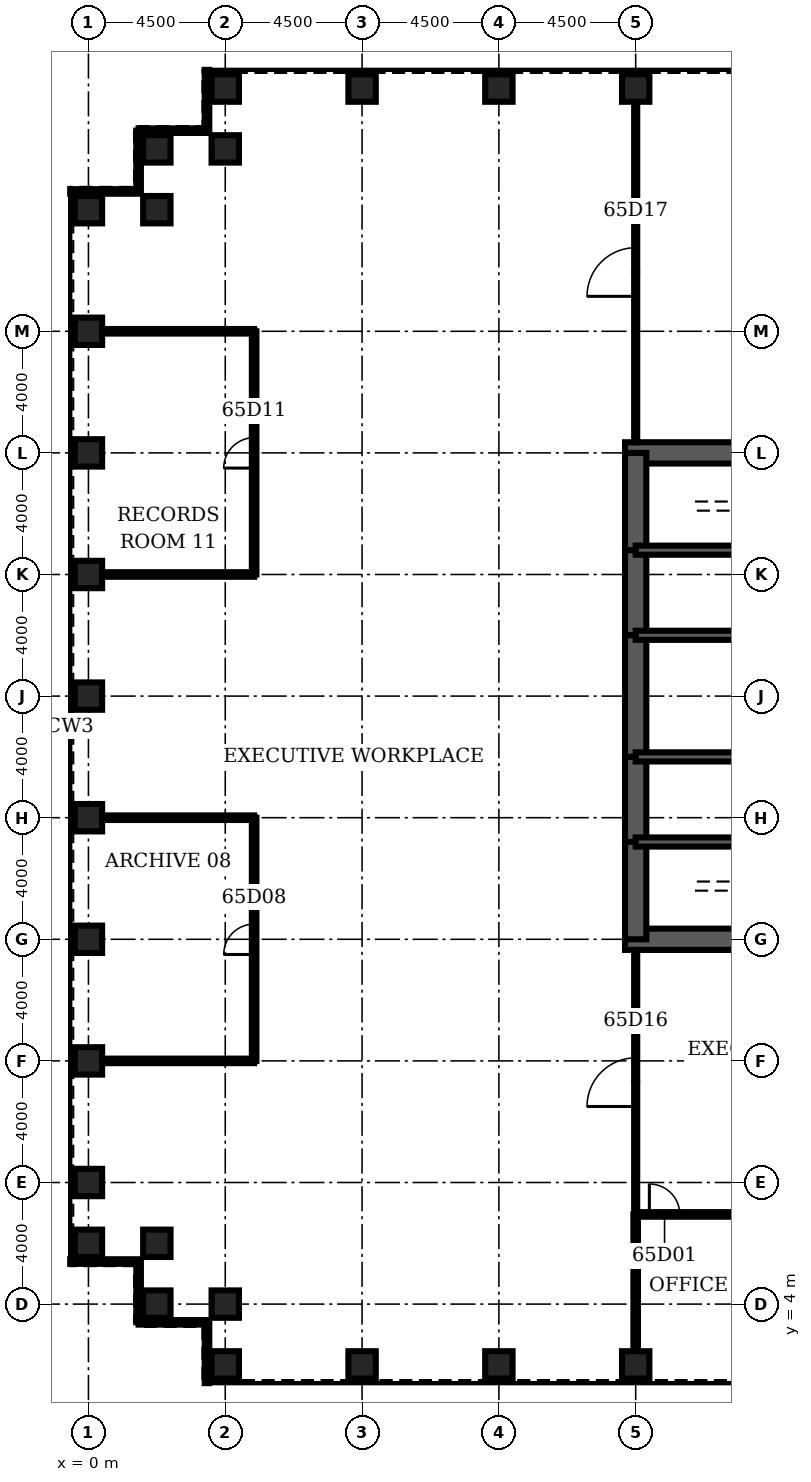
"""IFC4 building model, lengths in metres.
Left out: names, types, materials, properties, quantities, classifications, styles, units other than length and angle.
Written with IfcOpenShell. Run it as: python <this file> out.ifc"""

import sys

from ifc_helpers import new_model, si_unit, direction, frame, frame_2d, origin, origin_2d, place, context, subcontext, project, spatial, rectangle, hollow_rectangle, extrude, element, fill, save


model = new_model("IFC4")
c1 = context("Model", 3, precision=1e-05, world=origin(), true_north=direction((0.0, 1.0)))
c2 = subcontext(c1, "Body", "Model", "MODEL_VIEW")
j1 = project(units=[si_unit("LENGTHUNIT", "METRE"), si_unit("PLANEANGLEUNIT", "RADIAN")], contexts=[c1])
p1 = place(None, origin())
s1 = spatial("IfcSite", under=j1, at=p1, CompositionType="ELEMENT")
p2 = place(p1, origin())
s2 = spatial("IfcBuilding", under=s1, at=p2, CompositionType="ELEMENT")
p3 = place(p2, frame((0.0, 0.0, 287.9)))
s3 = spatial("IfcBuildingStorey", under=s2, at=p3, CompositionType="ELEMENT", Elevation=287.9)
for number, where, z_axis, x_axis in (
    (1, (4.5, 2.0, 0.0), (0.0, 0.0, 1.0), (0.0, 1.0, 0.0)),
    (2, (9.0, 2.0, 0.0), (0.0, 0.0, 1.0), (0.0, 1.0, 0.0)),
    (3, (13.5, 2.0, 0.0), (0.0, 0.0, 1.0), (0.0, 1.0, 0.0)),
    (4, (18.0, 2.0, 0.0), (0.0, 0.0, 1.0), (0.0, 1.0, 0.0)),
    (5, (18.0, 44.0, 0.0), (0.0, 0.0, 1.0), (0.0, 1.0, 0.0)),
    (6, (13.5, 44.0, 0.0), (0.0, 0.0, 1.0), (0.0, 1.0, 0.0)),
    (7, (9.0, 44.0, 0.0), (0.0, 0.0, 1.0), (0.0, 1.0, 0.0)),
    (8, (4.5, 44.0, 0.0), (0.0, 0.0, 1.0), (0.0, 1.0, 0.0)),
    (9, (4.5, 42.0, 0.0), (0.0, 0.0, 1.0), (0.0, 1.0, 0.0)),
    (10, (2.25, 42.0, 0.0), (0.0, 0.0, 1.0), (1.0, 0.0, 0.0)),
    (11, (2.25, 40.0, 0.0), (0.0, 0.0, 1.0), (1.0, 0.0, 0.0)),
    (12, (0.0, 40.0, 0.0), (0.0, 0.0, 1.0), (1.0, 0.0, 0.0)),
    (13, (0.0, 36.0, 0.0), (0.0, 0.0, 1.0), (1.0, 0.0, 0.0)),
    (14, (0.0, 32.0, 0.0), (0.0, 0.0, 1.0), (1.0, 0.0, 0.0)),
    (15, (0.0, 28.0, 0.0), (0.0, 0.0, 1.0), (1.0, 0.0, 0.0)),
    (16, (0.0, 24.0, 0.0), (0.0, 0.0, 1.0), (1.0, 0.0, 0.0)),
    (17, (0.0, 20.0, 0.0), (0.0, 0.0, 1.0), (1.0, 0.0, 0.0)),
    (18, (0.0, 16.0, 0.0), (0.0, 0.0, 1.0), (1.0, 0.0, 0.0)),
    (19, (0.0, 12.0, 0.0), (0.0, 0.0, 1.0), (1.0, 0.0, 0.0)),
    (20, (0.0, 8.0, 0.0), (0.0, 0.0, 1.0), (1.0, 0.0, 0.0)),
    (21, (0.0, 6.0, 0.0), (0.0, 0.0, 1.0), (1.0, 0.0, 0.0)),
    (22, (2.25, 6.0, 0.0), (0.0, 0.0, 1.0), (1.0, 0.0, 0.0)),
    (23, (2.25, 4.0, 0.0), (0.0, 0.0, 1.0), (1.0, 0.0, 0.0)),
    (24, (4.5, 4.0, 0.0), (0.0, 0.0, 1.0), (0.0, 1.0, 0.0)),
):
    element("IfcColumn", number, at=place(p3, frame(where, z_axis=z_axis, x_axis=x_axis)), inside=s3, PredefinedType="COLUMN", context=c2, shape_type="SweptSolid", body=[
        extrude(hollow_rectangle(XDim=0.9, YDim=0.9, WallThickness=0.07, at=origin_2d()), origin(), (0.0, 0.0, 1.0), 4.2),
    ])
for number, where, z_axis, x_axis in (
    (25, (17.65, 16.0, 0.0), (0.0, 0.0, 1.0), (1.0, 0.0, 0.0)),
    (26, (27.0, 32.0, 0.0), (0.0, 0.0, 1.0), (-1.0, 0.0, 0.0)),
):
    element("IfcWall", number, at=place(p3, frame(where, z_axis=z_axis, x_axis=x_axis)), inside=s3, PredefinedType="SHEAR", context=c2, shape_type="SweptSolid", body=[
        extrude(rectangle(XDim=9.35, YDim=0.7, at=frame_2d((4.675, 0.0))), origin(), (0.0, 0.0, 1.0), 4.2),
    ])
p4 = place(p3, frame((18.0, 32.0, 0.0), z_axis=(0.0, 0.0, 1.0), x_axis=(0.0, -1.0, 0.0)))
e27 = element("IfcWall", 27, at=p4, inside=s3, PredefinedType="SHEAR", context=c2, shape_type="SweptSolid", body=[
    extrude(rectangle(XDim=3.2, YDim=0.7, at=frame_2d((1.6, 0.0))), origin(), (0.0, 0.0, 1.0), 4.2),
])
p5 = place(p3, frame((18.0, 28.8, 0.0), z_axis=(0.0, 0.0, 1.0), x_axis=(0.0, -1.0, 0.0)))
e28 = element("IfcWall", 28, at=p5, inside=s3, PredefinedType="SHEAR", context=c2, shape_type="SweptSolid", body=[
    extrude(rectangle(XDim=2.8, YDim=0.7, at=frame_2d((1.4, 0.0))), origin(), (0.0, 0.0, 1.0), 4.2),
])
p6 = place(p5, frame((0.4, 0.0, 0.0)))
e29 = element("IfcOpeningElement", 29, at=p6, cuts=e28, PredefinedType="OPENING", context=c2, shape_type="SweptSolid", body=[
    extrude(rectangle(XDim=1.8, YDim=2.1, at=frame_2d((0.9, 1.05))), frame((0.0, 0.36, 0.0), z_axis=(0.0, -1.0, 0.0), x_axis=(1.0, 0.0, 0.0)), (0.0, 0.0, 1.0), 0.72),
])
p7 = place(p3, frame((18.0, 26.0, 0.0), z_axis=(0.0, 0.0, 1.0), x_axis=(0.0, -1.0, 0.0)))
e30 = element("IfcWall", 30, at=p7, inside=s3, PredefinedType="SHEAR", context=c2, shape_type="SweptSolid", body=[
    extrude(rectangle(XDim=4.0, YDim=0.7, at=frame_2d((2.0, 0.0))), origin(), (0.0, 0.0, 1.0), 4.2),
])
p8 = place(p3, frame((18.0, 22.0, 0.0), z_axis=(0.0, 0.0, 1.0), x_axis=(0.0, -1.0, 0.0)))
e31 = element("IfcWall", 31, at=p8, inside=s3, PredefinedType="SHEAR", context=c2, shape_type="SweptSolid", body=[
    extrude(rectangle(XDim=2.8, YDim=0.7, at=frame_2d((1.4, 0.0))), origin(), (0.0, 0.0, 1.0), 4.2),
])
p9 = place(p8, frame((0.6, 0.0, 0.0)))
e32 = element("IfcOpeningElement", 32, at=p9, cuts=e31, PredefinedType="OPENING", context=c2, shape_type="SweptSolid", body=[
    extrude(rectangle(XDim=1.8, YDim=2.1, at=frame_2d((0.9, 1.05))), frame((0.0, 0.36, 0.0), z_axis=(0.0, -1.0, 0.0), x_axis=(1.0, 0.0, 0.0)), (0.0, 0.0, 1.0), 0.72),
])
p10 = place(p3, frame((18.0, 19.2, 0.0), z_axis=(0.0, 0.0, 1.0), x_axis=(0.0, -1.0, 0.0)))
e33 = element("IfcWall", 33, at=p10, inside=s3, PredefinedType="SHEAR", context=c2, shape_type="SweptSolid", body=[
    extrude(rectangle(XDim=3.2, YDim=0.7, at=frame_2d((1.6, 0.0))), origin(), (0.0, 0.0, 1.0), 4.2),
])
p11 = place(p3, frame((18.0, 19.2, 0.0), z_axis=(0.0, 0.0, 1.0), x_axis=(1.0, 0.0, 0.0)))
e34 = element("IfcWall", 34, at=p11, inside=s3, PredefinedType="SOLIDWALL", context=c2, shape_type="SweptSolid", body=[
    extrude(rectangle(XDim=9.0, YDim=0.3, at=frame_2d((4.5, 0.0))), origin(), (0.0, 0.0, 1.0), 4.2),
])
p12 = place(p11, frame((0.65, 0.0, 0.0)))
e35 = element("IfcOpeningElement", 35, at=p12, cuts=e34, PredefinedType="OPENING", context=c2, shape_type="SweptSolid", body=[
    extrude(rectangle(XDim=1.0, YDim=2.1, at=frame_2d((0.5, 1.05))), frame((0.0, 0.16, 0.0), z_axis=(0.0, -1.0, 0.0), x_axis=(1.0, 0.0, 0.0)), (0.0, 0.0, 1.0), 0.32),
])
p13 = place(p3, frame((18.0, 28.8, 0.0), z_axis=(0.0, 0.0, 1.0), x_axis=(1.0, 0.0, 0.0)))
e36 = element("IfcWall", 36, at=p13, inside=s3, PredefinedType="SOLIDWALL", context=c2, shape_type="SweptSolid", body=[
    extrude(rectangle(XDim=9.0, YDim=0.3, at=frame_2d((4.5, 0.0))), origin(), (0.0, 0.0, 1.0), 4.2),
])
p14 = place(p13, frame((0.65, 0.0, 0.0)))
e37 = element("IfcOpeningElement", 37, at=p14, cuts=e36, PredefinedType="OPENING", context=c2, shape_type="SweptSolid", body=[
    extrude(rectangle(XDim=1.0, YDim=2.1, at=frame_2d((0.5, 1.05))), frame((0.0, 0.16, 0.0), z_axis=(0.0, -1.0, 0.0), x_axis=(1.0, 0.0, 0.0)), (0.0, 0.0, 1.0), 0.32),
])
p15 = place(p3, frame((18.0, 22.0, 0.0), z_axis=(0.0, 0.0, 1.0), x_axis=(1.0, 0.0, 0.0)))
e38 = element("IfcWall", 38, at=p15, inside=s3, PredefinedType="SOLIDWALL", context=c2, shape_type="SweptSolid", body=[
    extrude(rectangle(XDim=6.0, YDim=0.3, at=frame_2d((3.0, 0.0))), origin(), (0.0, 0.0, 1.0), 4.2),
])
p16 = place(p15, frame((4.4, 0.0, 0.0)))
e39 = element("IfcOpeningElement", 39, at=p16, cuts=e38, PredefinedType="OPENING", context=c2, shape_type="SweptSolid", body=[
    extrude(rectangle(XDim=1.0, YDim=2.1, at=frame_2d((0.5, 1.05))), frame((0.0, 0.16, 0.0), z_axis=(0.0, -1.0, 0.0), x_axis=(1.0, 0.0, 0.0)), (0.0, 0.0, 1.0), 0.32),
])
p17 = place(p15, frame((0.75, 0.0, 0.0)))
e40 = element("IfcOpeningElement", 40, at=p17, cuts=e38, PredefinedType="OPENING", context=c2, shape_type="SweptSolid", body=[
    extrude(rectangle(XDim=1.0, YDim=2.1, at=frame_2d((0.5, 1.05))), frame((0.0, 0.16, 0.0), z_axis=(0.0, -1.0, 0.0), x_axis=(1.0, 0.0, 0.0)), (0.0, 0.0, 1.0), 0.32),
])
p18 = place(p3, frame((18.0, 26.0, 0.0), z_axis=(0.0, 0.0, 1.0), x_axis=(1.0, 0.0, 0.0)))
e41 = element("IfcWall", 41, at=p18, inside=s3, PredefinedType="SOLIDWALL", context=c2, shape_type="SweptSolid", body=[
    extrude(rectangle(XDim=6.0, YDim=0.3, at=frame_2d((3.0, 0.0))), origin(), (0.0, 0.0, 1.0), 4.2),
])
p19 = place(p3, frame((20.225, 22.15, 0.0), z_axis=(0.0, 0.0, 1.0), x_axis=(0.0, 1.0, 0.0)))
e42 = element("IfcWall", 42, at=p19, inside=s3, PredefinedType="PARTITIONING", context=c2, shape_type="SweptSolid", body=[
    extrude(rectangle(XDim=3.7, YDim=0.15, at=frame_2d((1.85, 0.0))), origin(), (0.0, 0.0, 1.0), 3.0),
])
p20 = place(p3, frame((18.0, 6.95, 0.0), z_axis=(0.0, 0.0, 1.0), x_axis=(1.0, 0.0, 0.0)))
e43 = element("IfcWall", 43, at=p20, inside=s3, PredefinedType="PARTITIONING", context=c2, shape_type="SweptSolid", body=[
    extrude(rectangle(XDim=27.0, YDim=0.15, at=frame_2d((13.5, 0.0))), origin(), (0.0, 0.0, 1.0), 3.0),
])
p21 = place(p20, frame((0.45, 0.0, 0.0)))
e44 = element("IfcOpeningElement", 44, at=p21, cuts=e43, PredefinedType="OPENING", context=c2, shape_type="SweptSolid", body=[
    extrude(rectangle(XDim=1.0, YDim=2.1, at=frame_2d((0.5, 1.05))), frame((0.0, 0.085, 0.0), z_axis=(0.0, -1.0, 0.0), x_axis=(1.0, 0.0, 0.0)), (0.0, 0.0, 1.0), 0.17),
])
p22 = place(p20, frame((4.95, 0.0, 0.0)))
e45 = element("IfcOpeningElement", 45, at=p22, cuts=e43, PredefinedType="OPENING", context=c2, shape_type="SweptSolid", body=[
    extrude(rectangle(XDim=1.0, YDim=2.1, at=frame_2d((0.5, 1.05))), frame((0.0, 0.085, 0.0), z_axis=(0.0, -1.0, 0.0), x_axis=(1.0, 0.0, 0.0)), (0.0, 0.0, 1.0), 0.17),
])
p23 = place(p20, frame((9.45, 0.0, 0.0)))
e46 = element("IfcOpeningElement", 46, at=p23, cuts=e43, PredefinedType="OPENING", context=c2, shape_type="SweptSolid", body=[
    extrude(rectangle(XDim=1.0, YDim=2.1, at=frame_2d((0.5, 1.05))), frame((0.0, 0.085, 0.0), z_axis=(0.0, -1.0, 0.0), x_axis=(1.0, 0.0, 0.0)), (0.0, 0.0, 1.0), 0.17),
])
p24 = place(p20, frame((13.95, 0.0, 0.0)))
e47 = element("IfcOpeningElement", 47, at=p24, cuts=e43, PredefinedType="OPENING", context=c2, shape_type="SweptSolid", body=[
    extrude(rectangle(XDim=1.0, YDim=2.1, at=frame_2d((0.5, 1.05))), frame((0.0, 0.085, 0.0), z_axis=(0.0, -1.0, 0.0), x_axis=(1.0, 0.0, 0.0)), (0.0, 0.0, 1.0), 0.17),
])
p25 = place(p20, frame((18.45, 0.0, 0.0)))
e48 = element("IfcOpeningElement", 48, at=p25, cuts=e43, PredefinedType="OPENING", context=c2, shape_type="SweptSolid", body=[
    extrude(rectangle(XDim=1.0, YDim=2.1, at=frame_2d((0.5, 1.05))), frame((0.0, 0.085, 0.0), z_axis=(0.0, -1.0, 0.0), x_axis=(1.0, 0.0, 0.0)), (0.0, 0.0, 1.0), 0.17),
])
p26 = place(p20, frame((22.95, 0.0, 0.0)))
e49 = element("IfcOpeningElement", 49, at=p26, cuts=e43, PredefinedType="OPENING", context=c2, shape_type="SweptSolid", body=[
    extrude(rectangle(XDim=1.0, YDim=2.1, at=frame_2d((0.5, 1.05))), frame((0.0, 0.085, 0.0), z_axis=(0.0, -1.0, 0.0), x_axis=(1.0, 0.0, 0.0)), (0.0, 0.0, 1.0), 0.17),
])
for number, where, z_axis, x_axis in (
    (50, (0.45, 12.0, 0.0), (0.0, 0.0, 1.0), (1.0, 0.0, 0.0)),
    (51, (0.45, 20.0, 0.0), (0.0, 0.0, 1.0), (1.0, 0.0, 0.0)),
    (52, (0.45, 28.0, 0.0), (0.0, 0.0, 1.0), (1.0, 0.0, 0.0)),
    (53, (0.45, 36.0, 0.0), (0.0, 0.0, 1.0), (1.0, 0.0, 0.0)),
):
    element("IfcWall", number, at=place(p3, frame(where, z_axis=z_axis, x_axis=x_axis)), inside=s3, PredefinedType="PARTITIONING", context=c2, shape_type="SweptSolid", body=[
        extrude(rectangle(XDim=5.0, YDim=0.15, at=frame_2d((2.5, 0.0))), origin(), (0.0, 0.0, 1.0), 3.0),
    ])
p27 = place(p3, frame((5.45, 12.0, 0.0), z_axis=(0.0, 0.0, 1.0), x_axis=(0.0, 1.0, 0.0)))
e54 = element("IfcWall", 54, at=p27, inside=s3, PredefinedType="PARTITIONING", context=c2, shape_type="SweptSolid", body=[
    extrude(rectangle(XDim=8.0, YDim=0.15, at=frame_2d((4.0, 0.0))), origin(), (0.0, 0.0, 1.0), 3.0),
])
p28 = place(p27, frame((3.5, 0.0, 0.0)))
e55 = element("IfcOpeningElement", 55, at=p28, cuts=e54, PredefinedType="OPENING", context=c2, shape_type="SweptSolid", body=[
    extrude(rectangle(XDim=1.0, YDim=2.1, at=frame_2d((0.5, 1.05))), frame((0.0, 0.085, 0.0), z_axis=(0.0, -1.0, 0.0), x_axis=(1.0, 0.0, 0.0)), (0.0, 0.0, 1.0), 0.17),
])
p29 = place(p3, frame((5.45, 28.0, 0.0), z_axis=(0.0, 0.0, 1.0), x_axis=(0.0, 1.0, 0.0)))
e56 = element("IfcWall", 56, at=p29, inside=s3, PredefinedType="PARTITIONING", context=c2, shape_type="SweptSolid", body=[
    extrude(rectangle(XDim=8.0, YDim=0.15, at=frame_2d((4.0, 0.0))), origin(), (0.0, 0.0, 1.0), 3.0),
])
p30 = place(p29, frame((3.5, 0.0, 0.0)))
e57 = element("IfcOpeningElement", 57, at=p30, cuts=e56, PredefinedType="OPENING", context=c2, shape_type="SweptSolid", body=[
    extrude(rectangle(XDim=1.0, YDim=2.1, at=frame_2d((0.5, 1.05))), frame((0.0, 0.085, 0.0), z_axis=(0.0, -1.0, 0.0), x_axis=(1.0, 0.0, 0.0)), (0.0, 0.0, 1.0), 0.17),
])
p31 = place(p3, frame((18.0, 2.45, 0.0), z_axis=(0.0, 0.0, 1.0), x_axis=(0.0, 1.0, 0.0)))
e58 = element("IfcWall", 58, at=p31, inside=s3, PredefinedType="PARTITIONING", context=c2, shape_type="SweptSolid", body=[
    extrude(rectangle(XDim=4.5, YDim=0.15, at=frame_2d((2.25, 0.0))), origin(), (0.0, 0.0, 1.0), 3.0),
])
p32 = place(p3, frame((18.0, 6.95, 0.0), z_axis=(0.0, 0.0, 1.0), x_axis=(0.0, 1.0, 0.0)))
e59 = element("IfcWall", 59, at=p32, inside=s3, PredefinedType="PARTITIONING", context=c2, shape_type="SweptSolid", body=[
    extrude(rectangle(XDim=8.7, YDim=0.1, at=frame_2d((4.35, 0.0))), origin(), (0.0, 0.0, 1.0), 3.0),
])
p33 = place(p32, frame((3.55, 0.0, 0.0)))
e60 = element("IfcOpeningElement", 60, at=p33, cuts=e59, PredefinedType="OPENING", context=c2, shape_type="SweptSolid", body=[
    extrude(rectangle(XDim=1.6, YDim=2.1, at=frame_2d((0.8, 1.05))), frame((0.0, 0.06, 0.0), z_axis=(0.0, -1.0, 0.0), x_axis=(1.0, 0.0, 0.0)), (0.0, 0.0, 1.0), 0.12),
])
p34 = place(p3, frame((18.0, 32.35, 0.0), z_axis=(0.0, 0.0, 1.0), x_axis=(0.0, 1.0, 0.0)))
e61 = element("IfcWall", 61, at=p34, inside=s3, PredefinedType="PARTITIONING", context=c2, shape_type="SweptSolid", body=[
    extrude(rectangle(XDim=11.2, YDim=0.1, at=frame_2d((5.6, 0.0))), origin(), (0.0, 0.0, 1.0), 3.0),
])
p35 = place(p34, frame((4.8, 0.0, 0.0)))
e62 = element("IfcOpeningElement", 62, at=p35, cuts=e61, PredefinedType="OPENING", context=c2, shape_type="SweptSolid", body=[
    extrude(rectangle(XDim=1.6, YDim=2.1, at=frame_2d((0.8, 1.05))), frame((0.0, 0.06, 0.0), z_axis=(0.0, -1.0, 0.0), x_axis=(1.0, 0.0, 0.0)), (0.0, 0.0, 1.0), 0.12),
])
p36 = place(p3, frame((3.9, 44.6, 0.0), z_axis=(0.0, 0.0, 1.0), x_axis=(0.0, -1.0, 0.0)))
e63 = element("IfcWall", 63, at=p36, inside=s3, PredefinedType="ELEMENTEDWALL", context=c2, shape_type="SweptSolid", body=[
    extrude(rectangle(XDim=2.0, YDim=0.15, at=frame_2d((1.0, 0.0))), origin(), (0.0, 0.0, 1.0), 4.04),
])
p37 = place(p3, frame((3.9, 42.6, 0.0), z_axis=(0.0, 0.0, 1.0), x_axis=(-1.0, 0.0, 0.0)))
e64 = element("IfcWall", 64, at=p37, inside=s3, PredefinedType="ELEMENTEDWALL", context=c2, shape_type="SweptSolid", body=[
    extrude(rectangle(XDim=2.25, YDim=0.15, at=frame_2d((1.125, 0.0))), origin(), (0.0, 0.0, 1.0), 4.04),
])
p38 = place(p3, frame((1.65, 42.6, 0.0), z_axis=(0.0, 0.0, 1.0), x_axis=(0.0, -1.0, 0.0)))
e65 = element("IfcWall", 65, at=p38, inside=s3, PredefinedType="ELEMENTEDWALL", context=c2, shape_type="SweptSolid", body=[
    extrude(rectangle(XDim=2.0, YDim=0.15, at=frame_2d((1.0, 0.0))), origin(), (0.0, 0.0, 1.0), 4.04),
])
for number, where, z_axis, x_axis in (
    (66, (1.65, 40.6, 0.0), (0.0, 0.0, 1.0), (-1.0, 0.0, 0.0)),
    (67, (-0.6, 5.4, 0.0), (0.0, 0.0, 1.0), (1.0, 0.0, 0.0)),
):
    element("IfcWall", number, at=place(p3, frame(where, z_axis=z_axis, x_axis=x_axis)), inside=s3, PredefinedType="ELEMENTEDWALL", context=c2, shape_type="SweptSolid", body=[
        extrude(rectangle(XDim=2.25, YDim=0.15, at=frame_2d((1.125, 0.0))), origin(), (0.0, 0.0, 1.0), 4.04),
    ])
p39 = place(p3, frame((1.65, 5.4, 0.0), z_axis=(0.0, 0.0, 1.0), x_axis=(0.0, -1.0, 0.0)))
e68 = element("IfcWall", 68, at=p39, inside=s3, PredefinedType="ELEMENTEDWALL", context=c2, shape_type="SweptSolid", body=[
    extrude(rectangle(XDim=2.0, YDim=0.15, at=frame_2d((1.0, 0.0))), origin(), (0.0, 0.0, 1.0), 4.04),
])
p40 = place(p3, frame((1.65, 3.4, 0.0), z_axis=(0.0, 0.0, 1.0), x_axis=(1.0, 0.0, 0.0)))
e69 = element("IfcWall", 69, at=p40, inside=s3, PredefinedType="ELEMENTEDWALL", context=c2, shape_type="SweptSolid", body=[
    extrude(rectangle(XDim=2.25, YDim=0.15, at=frame_2d((1.125, 0.0))), origin(), (0.0, 0.0, 1.0), 4.04),
])
p41 = place(p3, frame((3.9, 3.4, 0.0), z_axis=(0.0, 0.0, 1.0), x_axis=(0.0, -1.0, 0.0)))
e70 = element("IfcWall", 70, at=p41, inside=s3, PredefinedType="ELEMENTEDWALL", context=c2, shape_type="SweptSolid", body=[
    extrude(rectangle(XDim=2.0, YDim=0.15, at=frame_2d((1.0, 0.0))), origin(), (0.0, 0.0, 1.0), 4.04),
])
p42 = place(p21, origin())
e71 = element("IfcDoor", 71, at=p42, inside=s3, OperationType="SINGLE_SWING_LEFT", PredefinedType="DOOR", context=c2, shape_type="SweptSolid", body=[
    extrude(rectangle(XDim=1.0, YDim=2.1, at=frame_2d((0.5, 1.05))), frame((0.0, 0.025, 0.0), z_axis=(0.0, -1.0, 0.0), x_axis=(1.0, 0.0, 0.0)), (0.0, 0.0, 1.0), 0.05),
])
fill(e44, e71)
p43 = place(p28, origin())
e72 = element("IfcDoor", 72, at=p43, inside=s3, OperationType="SINGLE_SWING_LEFT", PredefinedType="DOOR", context=c2, shape_type="SweptSolid", body=[
    extrude(rectangle(XDim=1.0, YDim=2.1, at=frame_2d((0.5, 1.05))), frame((0.0, 0.025, 0.0), z_axis=(0.0, -1.0, 0.0), x_axis=(1.0, 0.0, 0.0)), (0.0, 0.0, 1.0), 0.05),
])
fill(e55, e72)
p44 = place(p30, origin())
e73 = element("IfcDoor", 73, at=p44, inside=s3, OperationType="SINGLE_SWING_LEFT", PredefinedType="DOOR", context=c2, shape_type="SweptSolid", body=[
    extrude(rectangle(XDim=1.0, YDim=2.1, at=frame_2d((0.5, 1.05))), frame((0.0, 0.025, 0.0), z_axis=(0.0, -1.0, 0.0), x_axis=(1.0, 0.0, 0.0)), (0.0, 0.0, 1.0), 0.05),
])
fill(e57, e73)
p45 = place(p33, origin())
e74 = element("IfcDoor", 74, at=p45, inside=s3, OperationType="SINGLE_SWING_LEFT", PredefinedType="DOOR", context=c2, shape_type="SweptSolid", body=[
    extrude(rectangle(XDim=1.6, YDim=2.1, at=frame_2d((0.8, 1.05))), frame((0.0, 0.025, 0.0), z_axis=(0.0, -1.0, 0.0), x_axis=(1.0, 0.0, 0.0)), (0.0, 0.0, 1.0), 0.05),
])
fill(e60, e74)
p46 = place(p35, origin())
e75 = element("IfcDoor", 75, at=p46, inside=s3, OperationType="SINGLE_SWING_LEFT", PredefinedType="DOOR", context=c2, shape_type="SweptSolid", body=[
    extrude(rectangle(XDim=1.6, YDim=2.1, at=frame_2d((0.8, 1.05))), frame((0.0, 0.025, 0.0), z_axis=(0.0, -1.0, 0.0), x_axis=(1.0, 0.0, 0.0)), (0.0, 0.0, 1.0), 0.05),
])
fill(e62, e75)
p47 = place(p12, origin())
e76 = element("IfcDoor", 76, at=p47, inside=s3, OperationType="SINGLE_SWING_LEFT", PredefinedType="DOOR", context=c2, shape_type="SweptSolid", body=[
    extrude(rectangle(XDim=1.0, YDim=2.1, at=frame_2d((0.5, 1.05))), frame((0.0, 0.025, 0.0), z_axis=(0.0, -1.0, 0.0), x_axis=(1.0, 0.0, 0.0)), (0.0, 0.0, 1.0), 0.05),
])
fill(e35, e76)
p48 = place(p14, origin())
e77 = element("IfcDoor", 77, at=p48, inside=s3, OperationType="SINGLE_SWING_LEFT", PredefinedType="DOOR", context=c2, shape_type="SweptSolid", body=[
    extrude(rectangle(XDim=1.0, YDim=2.1, at=frame_2d((0.5, 1.05))), frame((0.0, 0.025, 0.0), z_axis=(0.0, -1.0, 0.0), x_axis=(1.0, 0.0, 0.0)), (0.0, 0.0, 1.0), 0.05),
])
fill(e37, e77)
p49 = place(p9, origin())
e78 = element("IfcDoor", 78, at=p49, inside=s3, OperationType="SINGLE_SWING_LEFT", PredefinedType="DOOR", context=c2, shape_type="SweptSolid", body=[
    extrude(rectangle(XDim=1.8, YDim=2.1, at=frame_2d((0.9, 1.05))), frame((0.0, 0.35, 0.0), z_axis=(0.0, -1.0, 0.0), x_axis=(1.0, 0.0, 0.0)), (0.0, 0.0, 1.0), 0.699),
])
fill(e32, e78)
p50 = place(p6, origin())
e79 = element("IfcDoor", 79, at=p50, inside=s3, OperationType="SINGLE_SWING_LEFT", PredefinedType="DOOR", context=c2, shape_type="SweptSolid", body=[
    extrude(rectangle(XDim=1.8, YDim=2.1, at=frame_2d((0.9, 1.05))), frame((0.0, 0.35, 0.0), z_axis=(0.0, -1.0, 0.0), x_axis=(1.0, 0.0, 0.0)), (0.0, 0.0, 1.0), 0.699),
])
fill(e29, e79)
p51 = place(p17, origin())
e80 = element("IfcDoor", 80, at=p51, inside=s3, OperationType="SINGLE_SWING_LEFT", PredefinedType="DOOR", context=c2, shape_type="SweptSolid", body=[
    extrude(rectangle(XDim=1.0, YDim=2.1, at=frame_2d((0.5, 1.05))), frame((0.0, 0.025, 0.0), z_axis=(0.0, -1.0, 0.0), x_axis=(1.0, 0.0, 0.0)), (0.0, 0.0, 1.0), 0.05),
])
fill(e40, e80)
save(model, sys.argv[1])
